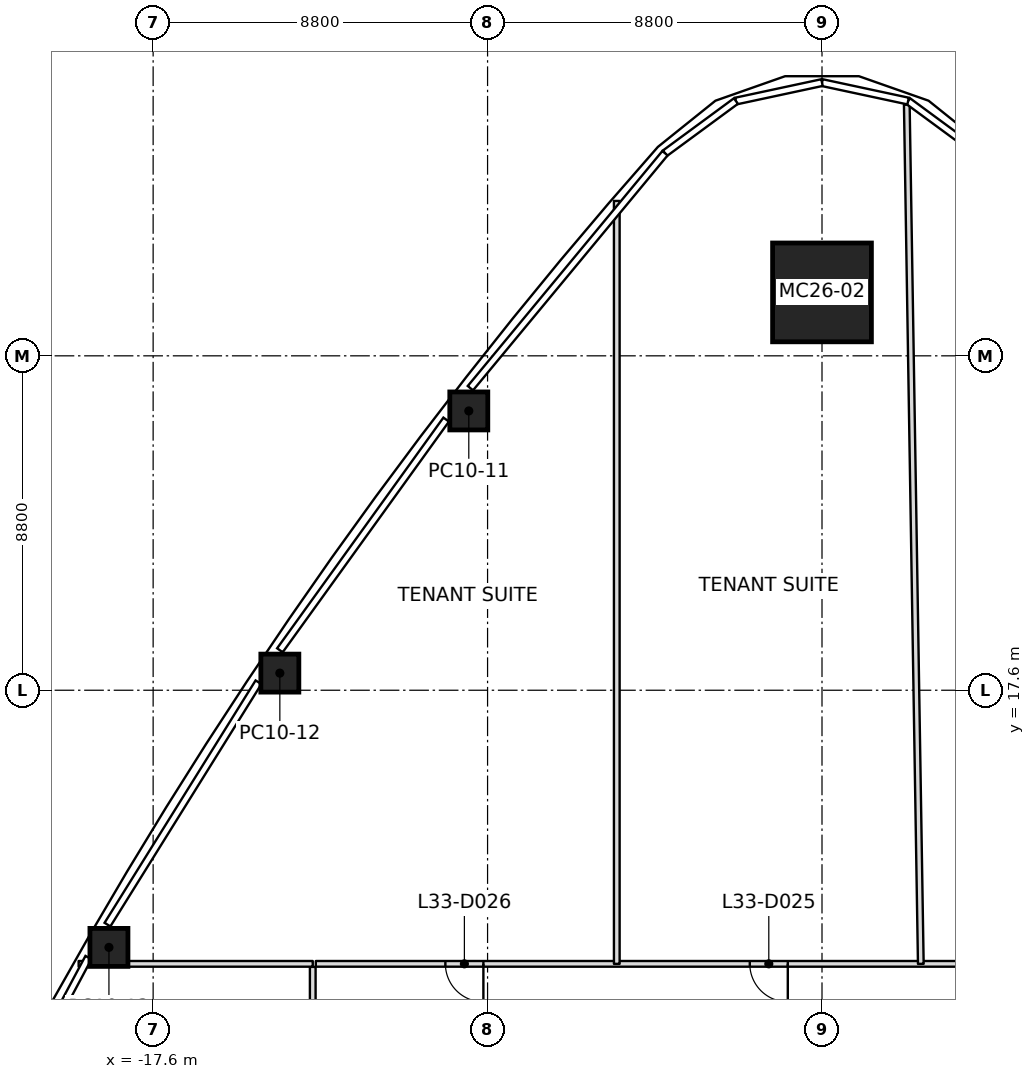
"""IFC4 building model, lengths in metres.
Left out: names, types, materials, properties, quantities, classifications, styles, units other than length and angle.
Written with IfcOpenShell. Run it as: python <this file> out.ifc"""

import sys

from ifc_helpers import new_model, si_unit, direction, frame, frame_2d, origin, origin_2d, place, context, subcontext, project, spatial, rectangle, extrude, element, fill, save


model = new_model("IFC4")
c1 = context("Model", 3, precision=1e-05, world=origin(), true_north=direction((0.0, 1.0)))
c2 = subcontext(c1, "Body", "Model", "MODEL_VIEW")
j1 = project(units=[si_unit("LENGTHUNIT", "METRE"), si_unit("PLANEANGLEUNIT", "RADIAN")], contexts=[c1])
p1 = place(None, origin())
s1 = spatial("IfcSite", under=j1, at=p1, CompositionType="ELEMENT")
p2 = place(p1, origin())
s2 = spatial("IfcBuilding", under=s1, at=p2, CompositionType="ELEMENT")
p3 = place(p2, frame((0.0, 0.0, 153.8)))
s3 = spatial("IfcBuildingStorey", under=s2, at=p3, CompositionType="ELEMENT", Elevation=153.8)
p4 = place(p3, frame((0.0, 28.069, 0.0), z_axis=(0.0, -0.032453598962, 0.999473243221), x_axis=(1.0, 0.0, 0.0)))
e1 = element("IfcColumn", 1, at=p4, inside=s3, PredefinedType="COLUMN", context=c2, shape_type="SweptSolid", body=[
    extrude(rectangle(XDim=2.6, YDim=2.6, at=origin_2d()), origin(), (0.0, 0.0, 1.0), 4.002),
])
p5 = place(p3, frame((-9.294, 24.95, 0.0), z_axis=(0.000183066973, -0.020503501027, 0.999789764367), x_axis=(0.611585028009, 0.79101467846, 0.016109996147)))
e2 = element("IfcColumn", 2, at=p5, inside=s3, PredefinedType="COLUMN", context=c2, shape_type="SweptSolid", body=[
    extrude(rectangle(XDim=1.0, YDim=1.0, at=origin_2d()), origin(), (0.0, 0.0, 1.0), 4.001),
])
p6 = place(p3, frame((-14.266, 18.051, 0.0), z_axis=(0.005248490815, -0.013243284963, 0.999898529226), x_axis=(0.557043340831, 0.830444164861, 0.008074991239)))
e3 = element("IfcColumn", 3, at=p6, inside=s3, PredefinedType="COLUMN", context=c2, shape_type="SweptSolid", body=[
    extrude(rectangle(XDim=1.0, YDim=1.0, at=origin_2d()), origin(), (0.0, 0.0, 1.0), 4.0),
])
p7 = place(p3, frame((-18.763, 10.833, 0.0), z_axis=(0.009948074445, -0.005736926367, 0.999934059571), x_axis=(0.499975258342, 0.8660396879, -5.385525e-06)))
e4 = element("IfcColumn", 4, at=p7, inside=s3, PredefinedType="COLUMN", context=c2, shape_type="SweptSolid", body=[
    extrude(rectangle(XDim=1.0, YDim=1.0, at=origin_2d()), origin(), (0.0, 0.0, 1.0), 4.0),
])
p8 = place(p3, frame((-13.4, 10.4, 0.0), z_axis=(0.0, 0.0, 1.0), x_axis=(-1.0, 0.0, 0.0)))
e5 = element("IfcWall", 5, at=p8, inside=s3, PredefinedType="PARTITIONING", context=c2, shape_type="SweptSolid", body=[
    extrude(rectangle(XDim=6.16, YDim=0.15, at=frame_2d((3.08, 0.0))), origin(), (0.0, 0.0, 1.0), 3.234),
])
p9 = place(p3, frame((-5.4, 10.4, 0.0), z_axis=(0.0, 0.0, 1.0), x_axis=(0.0, 1.0, 0.0)))
e6 = element("IfcWall", 6, at=p9, inside=s3, PredefinedType="PARTITIONING", context=c2, shape_type="SweptSolid", body=[
    extrude(rectangle(XDim=20.076, YDim=0.15, at=frame_2d((10.038, 0.0))), origin(), (0.0, 0.0, 1.0), 3.084),
])
p10 = place(p3, frame((2.6, 10.4, 0.0), z_axis=(0.0, 0.0, 1.0), x_axis=(-0.016312152696, 0.999866947986, 0.0)))
e7 = element("IfcWall", 7, at=p10, inside=s3, PredefinedType="PARTITIONING", context=c2, shape_type="SweptSolid", body=[
    extrude(rectangle(XDim=22.615, YDim=0.15, at=frame_2d((11.307, 0.0))), origin(), (0.0, 0.0, 1.0), 3.084),
])
p11 = place(p3, frame((-13.4, 10.32, 0.0), z_axis=(0.0, 0.0, 1.0), x_axis=(0.0, -1.0, 0.0)))
e8 = element("IfcWall", 8, at=p11, inside=s3, PredefinedType="PARTITIONING", context=c2, shape_type="SweptSolid", body=[
    extrude(rectangle(XDim=20.64, YDim=0.15, at=frame_2d((10.32, 0.0))), origin(), (0.0, 0.0, 1.0), 3.166),
])
p12 = place(p11, frame((5.82, 0.0, 0.0)))
e9 = element("IfcOpeningElement", 9, at=p12, cuts=e8, PredefinedType="OPENING", context=c2, shape_type="SweptSolid", body=[
    extrude(rectangle(XDim=1.0, YDim=2.1, at=frame_2d((0.5, 1.05))), frame((0.0, 0.075, 0.0), z_axis=(0.0, -1.0, 0.0), x_axis=(1.0, 0.0, 0.0)), (0.0, 0.0, 1.0), 0.15),
])
p13 = place(p11, frame((14.37, 0.0, 0.0)))
e10 = element("IfcOpeningElement", 10, at=p13, cuts=e8, PredefinedType="OPENING", context=c2, shape_type="SweptSolid", body=[
    extrude(rectangle(XDim=0.9, YDim=2.1, at=frame_2d((0.45, 1.05))), frame((0.0, 0.075, 0.0), z_axis=(0.0, -1.0, 0.0), x_axis=(1.0, 0.0, 0.0)), (0.0, 0.0, 1.0), 0.15),
])
p14 = place(p11, frame((18.38, 0.0, 0.0)))
e11 = element("IfcOpeningElement", 11, at=p14, cuts=e8, PredefinedType="OPENING", context=c2, shape_type="SweptSolid", body=[
    extrude(rectangle(XDim=1.0, YDim=2.1, at=frame_2d((0.5, 1.05))), frame((0.0, 0.075, 0.0), z_axis=(0.0, -1.0, 0.0), x_axis=(1.0, 0.0, 0.0)), (0.0, 0.0, 1.0), 0.15),
])
p15 = place(p3, frame((13.32, 10.4, 0.0), z_axis=(0.0, 0.0, 1.0), x_axis=(-1.0, 0.0, 0.0)))
e12 = element("IfcWall", 12, at=p15, inside=s3, PredefinedType="PARTITIONING", context=c2, shape_type="SweptSolid", body=[
    extrude(rectangle(XDim=26.64, YDim=0.15, at=frame_2d((13.32, 0.0))), origin(), (0.0, 0.0, 1.0), 3.097),
])
p16 = place(p15, frame((1.55, 0.0, 0.0)))
e13 = element("IfcOpeningElement", 13, at=p16, cuts=e12, PredefinedType="OPENING", context=c2, shape_type="SweptSolid", body=[
    extrude(rectangle(XDim=0.9, YDim=2.1, at=frame_2d((0.45, 1.05))), frame((0.0, 0.075, 0.0), z_axis=(0.0, -1.0, 0.0), x_axis=(1.0, 0.0, 0.0)), (0.0, 0.0, 1.0), 0.15),
])
p17 = place(p15, frame((6.96, 0.0, 0.0)))
e14 = element("IfcOpeningElement", 14, at=p17, cuts=e12, PredefinedType="OPENING", context=c2, shape_type="SweptSolid", body=[
    extrude(rectangle(XDim=1.0, YDim=2.1, at=frame_2d((0.5, 1.05))), frame((0.0, 0.075, 0.0), z_axis=(0.0, -1.0, 0.0), x_axis=(1.0, 0.0, 0.0)), (0.0, 0.0, 1.0), 0.15),
])
p18 = place(p15, frame((14.22, 0.0, 0.0)))
e15 = element("IfcOpeningElement", 15, at=p18, cuts=e12, PredefinedType="OPENING", context=c2, shape_type="SweptSolid", body=[
    extrude(rectangle(XDim=1.0, YDim=2.1, at=frame_2d((0.5, 1.05))), frame((0.0, 0.075, 0.0), z_axis=(0.0, -1.0, 0.0), x_axis=(1.0, 0.0, 0.0)), (0.0, 0.0, 1.0), 0.15),
])
p19 = place(p15, frame((22.23, 0.0, 0.0)))
e16 = element("IfcOpeningElement", 16, at=p19, cuts=e12, PredefinedType="OPENING", context=c2, shape_type="SweptSolid", body=[
    extrude(rectangle(XDim=1.0, YDim=2.1, at=frame_2d((0.5, 1.05))), frame((0.0, 0.075, 0.0), z_axis=(0.0, -1.0, 0.0), x_axis=(1.0, 0.0, 0.0)), (0.0, 0.0, 1.0), 0.15),
])
p20 = place(p18, origin())
e17 = element("IfcDoor", 17, at=p20, inside=s3, OperationType="SINGLE_SWING_LEFT", PredefinedType="DOOR", context=c2, shape_type="SweptSolid", body=[
    extrude(rectangle(XDim=1.0, YDim=2.1, at=frame_2d((0.5, 1.05))), frame((0.0, 0.025, 0.0), z_axis=(0.0, -1.0, 0.0), x_axis=(1.0, 0.0, 0.0)), (0.0, 0.0, 1.0), 0.05),
])
fill(e15, e17)
p21 = place(p19, origin())
e18 = element("IfcDoor", 18, at=p21, inside=s3, OperationType="SINGLE_SWING_RIGHT", PredefinedType="DOOR", context=c2, shape_type="SweptSolid", body=[
    extrude(rectangle(XDim=1.0, YDim=2.1, at=frame_2d((0.5, 1.05))), frame((0.0, 0.025, 0.0), z_axis=(0.0, -1.0, 0.0), x_axis=(1.0, 0.0, 0.0)), (0.0, 0.0, 1.0), 0.05),
])
fill(e16, e18)
save(model, sys.argv[1])
